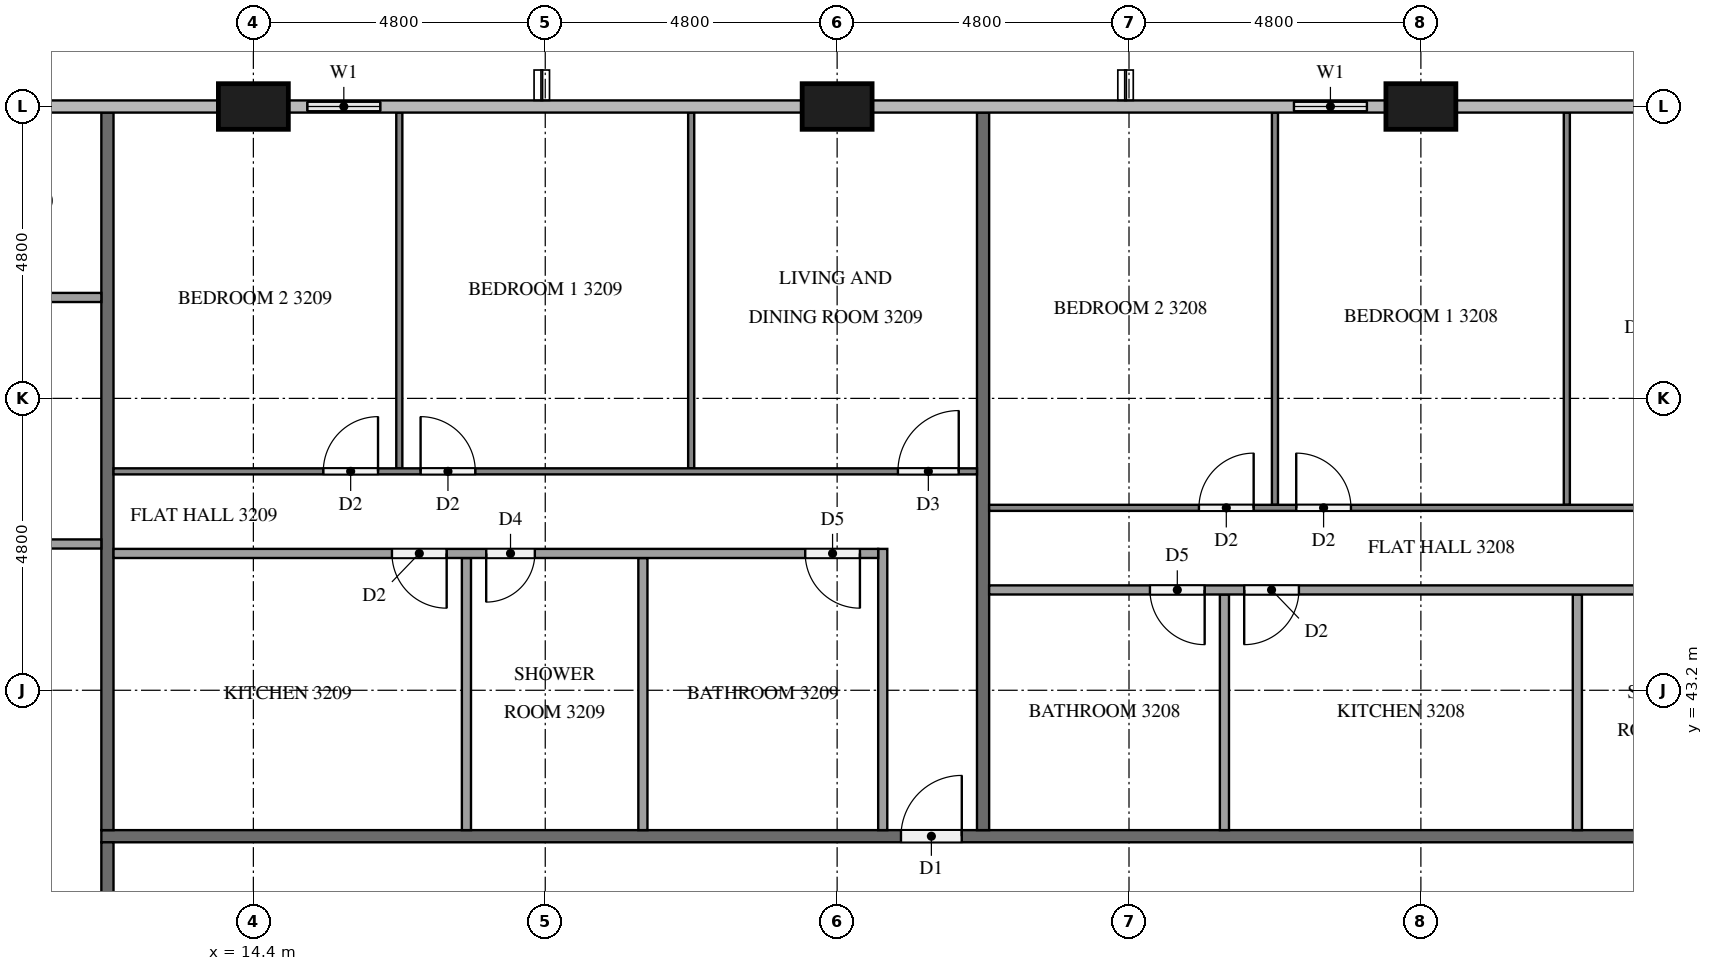
"""IFC4 building model, lengths in metres.
Left out: names, types, materials, properties, quantities, classifications, styles, units other than length and angle.
Written with IfcOpenShell. Run it as: python <this file> out.ifc"""

import sys

from ifc_helpers import new_model, si_unit, direction, frame, frame_2d, origin, origin_2d, place, context, subcontext, project, spatial, rectangle, extrude, element, fill, save


model = new_model("IFC4")
c1 = context("Model", 3, precision=1e-05, world=origin(), true_north=direction((0.0, 1.0)))
c2 = subcontext(c1, "Body", "Model", "MODEL_VIEW")
j1 = project(units=[si_unit("LENGTHUNIT", "METRE"), si_unit("PLANEANGLEUNIT", "RADIAN")], contexts=[c1])
p1 = place(None, origin())
s1 = spatial("IfcSite", under=j1, at=p1, CompositionType="ELEMENT")
p2 = place(p1, origin())
s2 = spatial("IfcBuilding", under=s1, at=p2, CompositionType="ELEMENT")
p3 = place(p2, frame((0.0, 0.0, 126.1)))
s3 = spatial("IfcBuildingStorey", under=s2, at=p3, CompositionType="ELEMENT", Elevation=126.1)
for number, where, z_axis, x_axis in (
    (1, (33.6, 52.8, 0.0), (0.0, 0.0, 1.0), (1.0, 0.0, 0.0)),
    (2, (24.0, 52.8, 0.0), (0.0, 0.0, 1.0), (1.0, 0.0, 0.0)),
    (3, (14.4, 52.8, 0.0), (0.0, 0.0, 1.0), (1.0, 0.0, 0.0)),
):
    element("IfcColumn", number, at=place(p3, frame(where, z_axis=z_axis, x_axis=x_axis)), inside=s3, PredefinedType="COLUMN", context=c2, shape_type="SweptSolid", body=[
        extrude(rectangle(XDim=1.15, YDim=0.75, at=origin_2d()), origin(), (0.0, 0.0, 1.0), 3.2),
    ])
p4 = place(p3, frame((33.025, 52.8, 0.0), z_axis=(0.0, 0.0, 1.0), x_axis=(-1.0, 0.0, 0.0)))
e4 = element("IfcWall", 4, at=p4, inside=s3, PredefinedType="SOLIDWALL", context=c2, shape_type="SweptSolid", body=[
    extrude(rectangle(XDim=1.825, YDim=0.15, at=frame_2d((0.913, 0.0))), origin(), (0.0, 0.0, 1.0), 3.2),
])
p5 = place(p4, frame((0.312, 0.0, 0.9)))
e5 = element("IfcOpeningElement", 5, at=p5, cuts=e4, PredefinedType="OPENING", context=c2, shape_type="SweptSolid", body=[
    extrude(rectangle(XDim=1.2, YDim=1.4, at=frame_2d((0.6, 0.7))), frame((0.0, 0.085, 0.0), z_axis=(0.0, -1.0, 0.0), x_axis=(1.0, 0.0, 0.0)), (0.0, 0.0, 1.0), 0.17),
])
p6 = place(p3, frame((16.8, 52.8, 0.0), z_axis=(0.0, 0.0, 1.0), x_axis=(-1.0, 0.0, 0.0)))
e6 = element("IfcWall", 6, at=p6, inside=s3, PredefinedType="SOLIDWALL", context=c2, shape_type="SweptSolid", body=[
    extrude(rectangle(XDim=1.825, YDim=0.15, at=frame_2d((0.913, 0.0))), origin(), (0.0, 0.0, 1.0), 3.2),
])
p7 = place(p6, frame((0.312, 0.0, 0.9)))
e7 = element("IfcOpeningElement", 7, at=p7, cuts=e6, PredefinedType="OPENING", context=c2, shape_type="SweptSolid", body=[
    extrude(rectangle(XDim=1.2, YDim=1.4, at=frame_2d((0.6, 0.7))), frame((0.0, 0.085, 0.0), z_axis=(0.0, -1.0, 0.0), x_axis=(1.0, 0.0, 0.0)), (0.0, 0.0, 1.0), 0.17),
])
p8 = place(p3, frame((11.9, 40.8, 0.0), z_axis=(0.0, 0.0, 1.0), x_axis=(1.0, 0.0, 0.0)))
e8 = element("IfcWall", 8, at=p8, inside=s3, PredefinedType="PARTITIONING", context=c2, shape_type="SweptSolid", body=[
    extrude(rectangle(XDim=38.6, YDim=0.2, at=frame_2d((19.3, 0.0))), origin(), (0.0, 0.0, 1.0), 3.2),
])
p9 = place(p8, frame((37.15, 0.0, 0.0)))
e9 = element("IfcOpeningElement", 9, at=p9, cuts=e8, PredefinedType="OPENING", context=c2, shape_type="SweptSolid", body=[
    extrude(rectangle(XDim=1.0, YDim=2.1, at=frame_2d((0.5, 1.05))), frame((0.0, 0.11, 0.0), z_axis=(0.0, -1.0, 0.0), x_axis=(1.0, 0.0, 0.0)), (0.0, 0.0, 1.0), 0.22),
])
p10 = place(p8, frame((27.55, 0.0, 0.0)))
e10 = element("IfcOpeningElement", 10, at=p10, cuts=e8, PredefinedType="OPENING", context=c2, shape_type="SweptSolid", body=[
    extrude(rectangle(XDim=1.0, YDim=2.1, at=frame_2d((0.5, 1.05))), frame((0.0, 0.11, 0.0), z_axis=(0.0, -1.0, 0.0), x_axis=(1.0, 0.0, 0.0)), (0.0, 0.0, 1.0), 0.22),
])
p11 = place(p8, frame((13.15, 0.0, 0.0)))
e11 = element("IfcOpeningElement", 11, at=p11, cuts=e8, PredefinedType="OPENING", context=c2, shape_type="SweptSolid", body=[
    extrude(rectangle(XDim=1.0, YDim=2.1, at=frame_2d((0.5, 1.05))), frame((0.0, 0.11, 0.0), z_axis=(0.0, -1.0, 0.0), x_axis=(1.0, 0.0, 0.0)), (0.0, 0.0, 1.0), 0.22),
])
p12 = place(p3, frame((12.0, 37.9, 0.0), z_axis=(0.0, 0.0, 1.0), x_axis=(0.0, 1.0, 0.0)))
e12 = element("IfcWall", 12, at=p12, inside=s3, PredefinedType="PARTITIONING", context=c2, shape_type="SweptSolid", body=[
    extrude(rectangle(XDim=2.8, YDim=0.2, at=frame_2d((1.4, 0.0))), origin(), (0.0, 0.0, 1.0), 3.2),
])
p13 = place(p12, frame((0.25, 0.0, 0.0)))
e13 = element("IfcOpeningElement", 13, at=p13, cuts=e12, PredefinedType="OPENING", context=c2, shape_type="SweptSolid", body=[
    extrude(rectangle(XDim=1.0, YDim=2.1, at=frame_2d((0.5, 1.05))), frame((0.0, 0.11, 0.0), z_axis=(0.0, -1.0, 0.0), x_axis=(1.0, 0.0, 0.0)), (0.0, 0.0, 1.0), 0.22),
])
for number, where, z_axis, x_axis in (
    (14, (26.4, 52.7, 0.0), (0.0, 0.0, 1.0), (0.0, -1.0, 0.0)),
    (15, (12.0, 52.7, 0.0), (0.0, 0.0, 1.0), (0.0, -1.0, 0.0)),
):
    element("IfcWall", number, at=place(p3, frame(where, z_axis=z_axis, x_axis=x_axis)), inside=s3, PredefinedType="PARTITIONING", context=c2, shape_type="SweptSolid", body=[
        extrude(rectangle(XDim=11.8, YDim=0.2, at=frame_2d((5.9, 0.0))), origin(), (0.0, 0.0, 1.0), 3.2),
    ])
for number, where, z_axis, x_axis in (
    (16, (36.0, 46.25, 0.0), (0.0, 0.0, 1.0), (0.0, 1.0, 0.0)),
    (17, (31.2, 46.25, 0.0), (0.0, 0.0, 1.0), (0.0, 1.0, 0.0)),
):
    element("IfcWall", number, at=place(p3, frame(where, z_axis=z_axis, x_axis=x_axis)), inside=s3, PredefinedType="PARTITIONING", context=c2, shape_type="SweptSolid", body=[
        extrude(rectangle(XDim=6.45, YDim=0.1, at=frame_2d((3.225, 0.0))), origin(), (0.0, 0.0, 1.0), 3.2),
    ])
p14 = place(p3, frame((26.5, 46.2, 0.0), z_axis=(0.0, 0.0, 1.0), x_axis=(1.0, 0.0, 0.0)))
e18 = element("IfcWall", 18, at=p14, inside=s3, PredefinedType="PARTITIONING", context=c2, shape_type="SweptSolid", body=[
    extrude(rectangle(XDim=14.2, YDim=0.1, at=frame_2d((7.1, 0.0))), origin(), (0.0, 0.0, 1.0), 3.2),
])
p15 = place(p14, frame((12.9, 0.0, 0.0)))
e19 = element("IfcOpeningElement", 19, at=p15, cuts=e18, PredefinedType="OPENING", context=c2, shape_type="SweptSolid", body=[
    extrude(rectangle(XDim=1.0, YDim=2.1, at=frame_2d((0.5, 1.05))), frame((0.0, 0.06, 0.0), z_axis=(0.0, -1.0, 0.0), x_axis=(1.0, 0.0, 0.0)), (0.0, 0.0, 1.0), 0.12),
])
p16 = place(p14, frame((5.05, 0.0, 0.0)))
e20 = element("IfcOpeningElement", 20, at=p16, cuts=e18, PredefinedType="OPENING", context=c2, shape_type="SweptSolid", body=[
    extrude(rectangle(XDim=0.9, YDim=2.1, at=frame_2d((0.45, 1.05))), frame((0.0, 0.06, 0.0), z_axis=(0.0, -1.0, 0.0), x_axis=(1.0, 0.0, 0.0)), (0.0, 0.0, 1.0), 0.12),
])
p17 = place(p14, frame((3.45, 0.0, 0.0)))
e21 = element("IfcOpeningElement", 21, at=p17, cuts=e18, PredefinedType="OPENING", context=c2, shape_type="SweptSolid", body=[
    extrude(rectangle(XDim=0.9, YDim=2.1, at=frame_2d((0.45, 1.05))), frame((0.0, 0.06, 0.0), z_axis=(0.0, -1.0, 0.0), x_axis=(1.0, 0.0, 0.0)), (0.0, 0.0, 1.0), 0.12),
])
for number, where, z_axis, x_axis in (
    (22, (36.173, 40.9, 0.0), (0.0, 0.0, 1.0), (0.0, 1.0, 0.0)),
    (23, (30.369, 40.9, 0.0), (0.0, 0.0, 1.0), (0.0, 1.0, 0.0)),
):
    element("IfcWall", number, at=place(p3, frame(where, z_axis=z_axis, x_axis=x_axis)), inside=s3, PredefinedType="PARTITIONING", context=c2, shape_type="SweptSolid", body=[
        extrude(rectangle(XDim=3.875, YDim=0.15, at=frame_2d((1.938, 0.0))), origin(), (0.0, 0.0, 1.0), 3.2),
    ])
p18 = place(p3, frame((39.075, 44.85, 0.0), z_axis=(0.0, 0.0, 1.0), x_axis=(-1.0, 0.0, 0.0)))
e24 = element("IfcWall", 24, at=p18, inside=s3, PredefinedType="PARTITIONING", context=c2, shape_type="SweptSolid", body=[
    extrude(rectangle(XDim=12.575, YDim=0.15, at=frame_2d((6.288, 0.0))), origin(), (0.0, 0.0, 1.0), 3.2),
])
p19 = place(p18, frame((0.3, 0.0, 0.0)))
e25 = element("IfcOpeningElement", 25, at=p19, cuts=e24, PredefinedType="OPENING", context=c2, shape_type="SweptSolid", body=[
    extrude(rectangle(XDim=0.8, YDim=2.1, at=frame_2d((0.4, 1.05))), frame((0.0, 0.085, 0.0), z_axis=(0.0, -1.0, 0.0), x_axis=(1.0, 0.0, 0.0)), (0.0, 0.0, 1.0), 0.17),
])
p20 = place(p18, frame((7.481, 0.0, 0.0)))
e26 = element("IfcOpeningElement", 26, at=p20, cuts=e24, PredefinedType="OPENING", context=c2, shape_type="SweptSolid", body=[
    extrude(rectangle(XDim=0.9, YDim=2.1, at=frame_2d((0.45, 1.05))), frame((0.0, 0.085, 0.0), z_axis=(0.0, -1.0, 0.0), x_axis=(1.0, 0.0, 0.0)), (0.0, 0.0, 1.0), 0.17),
])
p21 = place(p18, frame((9.031, 0.0, 0.0)))
e27 = element("IfcOpeningElement", 27, at=p21, cuts=e24, PredefinedType="OPENING", context=c2, shape_type="SweptSolid", body=[
    extrude(rectangle(XDim=0.9, YDim=2.1, at=frame_2d((0.45, 1.05))), frame((0.0, 0.085, 0.0), z_axis=(0.0, -1.0, 0.0), x_axis=(1.0, 0.0, 0.0)), (0.0, 0.0, 1.0), 0.17),
])
for number, where, z_axis, x_axis in (
    (28, (21.6, 46.85, 0.0), (0.0, 0.0, 1.0), (0.0, 1.0, 0.0)),
    (29, (16.8, 46.85, 0.0), (0.0, 0.0, 1.0), (0.0, 1.0, 0.0)),
):
    element("IfcWall", number, at=place(p3, frame(where, z_axis=z_axis, x_axis=x_axis)), inside=s3, PredefinedType="PARTITIONING", context=c2, shape_type="SweptSolid", body=[
        extrude(rectangle(XDim=5.85, YDim=0.1, at=frame_2d((2.925, 0.0))), origin(), (0.0, 0.0, 1.0), 3.2),
    ])
p22 = place(p3, frame((12.1, 46.8, 0.0), z_axis=(0.0, 0.0, 1.0), x_axis=(1.0, 0.0, 0.0)))
e30 = element("IfcWall", 30, at=p22, inside=s3, PredefinedType="PARTITIONING", context=c2, shape_type="SweptSolid", body=[
    extrude(rectangle(XDim=14.2, YDim=0.1, at=frame_2d((7.1, 0.0))), origin(), (0.0, 0.0, 1.0), 3.2),
])
p23 = place(p22, frame((12.9, 0.0, 0.0)))
e31 = element("IfcOpeningElement", 31, at=p23, cuts=e30, PredefinedType="OPENING", context=c2, shape_type="SweptSolid", body=[
    extrude(rectangle(XDim=1.0, YDim=2.1, at=frame_2d((0.5, 1.05))), frame((0.0, 0.06, 0.0), z_axis=(0.0, -1.0, 0.0), x_axis=(1.0, 0.0, 0.0)), (0.0, 0.0, 1.0), 0.12),
])
p24 = place(p22, frame((5.05, 0.0, 0.0)))
e32 = element("IfcOpeningElement", 32, at=p24, cuts=e30, PredefinedType="OPENING", context=c2, shape_type="SweptSolid", body=[
    extrude(rectangle(XDim=0.9, YDim=2.1, at=frame_2d((0.45, 1.05))), frame((0.0, 0.06, 0.0), z_axis=(0.0, -1.0, 0.0), x_axis=(1.0, 0.0, 0.0)), (0.0, 0.0, 1.0), 0.12),
])
p25 = place(p22, frame((3.45, 0.0, 0.0)))
e33 = element("IfcOpeningElement", 33, at=p25, cuts=e30, PredefinedType="OPENING", context=c2, shape_type="SweptSolid", body=[
    extrude(rectangle(XDim=0.9, YDim=2.1, at=frame_2d((0.45, 1.05))), frame((0.0, 0.06, 0.0), z_axis=(0.0, -1.0, 0.0), x_axis=(1.0, 0.0, 0.0)), (0.0, 0.0, 1.0), 0.12),
])
for number, where, z_axis, x_axis in (
    (34, (20.806, 40.9, 0.0), (0.0, 0.0, 1.0), (0.0, 1.0, 0.0)),
    (35, (17.904, 40.9, 0.0), (0.0, 0.0, 1.0), (0.0, 1.0, 0.0)),
):
    element("IfcWall", number, at=place(p3, frame(where, z_axis=z_axis, x_axis=x_axis)), inside=s3, PredefinedType="PARTITIONING", context=c2, shape_type="SweptSolid", body=[
        extrude(rectangle(XDim=4.475, YDim=0.15, at=frame_2d((2.238, 0.0))), origin(), (0.0, 0.0, 1.0), 3.2),
    ])
p26 = place(p3, frame((24.75, 40.9, 0.0), z_axis=(0.0, 0.0, 1.0), x_axis=(0.0, 1.0, 0.0)))
e36 = element("IfcWall", 36, at=p26, inside=s3, PredefinedType="PARTITIONING", context=c2, shape_type="SweptSolid", body=[
    extrude(rectangle(XDim=4.625, YDim=0.15, at=frame_2d((2.312, 0.0))), origin(), (0.0, 0.0, 1.0), 3.2),
])
p27 = place(p3, frame((24.675, 45.45, 0.0), z_axis=(0.0, 0.0, 1.0), x_axis=(-1.0, 0.0, 0.0)))
e37 = element("IfcWall", 37, at=p27, inside=s3, PredefinedType="PARTITIONING", context=c2, shape_type="SweptSolid", body=[
    extrude(rectangle(XDim=12.575, YDim=0.15, at=frame_2d((6.288, 0.0))), origin(), (0.0, 0.0, 1.0), 3.2),
])
p28 = place(p27, frame((0.3, 0.0, 0.0)))
e38 = element("IfcOpeningElement", 38, at=p28, cuts=e37, PredefinedType="OPENING", context=c2, shape_type="SweptSolid", body=[
    extrude(rectangle(XDim=0.9, YDim=2.1, at=frame_2d((0.45, 1.05))), frame((0.0, 0.085, 0.0), z_axis=(0.0, -1.0, 0.0), x_axis=(1.0, 0.0, 0.0)), (0.0, 0.0, 1.0), 0.17),
])
p29 = place(p27, frame((5.646, 0.0, 0.0)))
e39 = element("IfcOpeningElement", 39, at=p29, cuts=e37, PredefinedType="OPENING", context=c2, shape_type="SweptSolid", body=[
    extrude(rectangle(XDim=0.8, YDim=2.1, at=frame_2d((0.4, 1.05))), frame((0.0, 0.085, 0.0), z_axis=(0.0, -1.0, 0.0), x_axis=(1.0, 0.0, 0.0)), (0.0, 0.0, 1.0), 0.17),
])
p30 = place(p27, frame((7.096, 0.0, 0.0)))
e40 = element("IfcOpeningElement", 40, at=p30, cuts=e37, PredefinedType="OPENING", context=c2, shape_type="SweptSolid", body=[
    extrude(rectangle(XDim=0.9, YDim=2.1, at=frame_2d((0.45, 1.05))), frame((0.0, 0.085, 0.0), z_axis=(0.0, -1.0, 0.0), x_axis=(1.0, 0.0, 0.0)), (0.0, 0.0, 1.0), 0.17),
])
for number, where, z_axis, x_axis in (
    (41, (11.9, 45.606, 0.0), (0.0, 0.0, 1.0), (-1.0, 0.0, 0.0)),
    (42, (11.9, 49.66, 0.0), (0.0, 0.0, 1.0), (-1.0, 0.0, 0.0)),
):
    element("IfcWall", number, at=place(p3, frame(where, z_axis=z_axis, x_axis=x_axis)), inside=s3, PredefinedType="PARTITIONING", context=c2, shape_type="SweptSolid", body=[
        extrude(rectangle(XDim=4.175, YDim=0.15, at=frame_2d((2.087, 0.0))), origin(), (0.0, 0.0, 1.0), 3.2),
    ])
p31 = place(p5, origin())
e43 = element("IfcWindow", 43, at=p31, inside=s3, PartitioningType="SINGLE_PANEL", PredefinedType="WINDOW", context=c2, shape_type="SweptSolid", body=[
    extrude(rectangle(XDim=1.2, YDim=1.4, at=frame_2d((0.6, 0.7))), frame((0.0, 0.03, 0.0), z_axis=(0.0, -1.0, 0.0), x_axis=(1.0, 0.0, 0.0)), (0.0, 0.0, 1.0), 0.06),
])
fill(e5, e43)
p32 = place(p7, origin())
e44 = element("IfcWindow", 44, at=p32, inside=s3, PartitioningType="SINGLE_PANEL", PredefinedType="WINDOW", context=c2, shape_type="SweptSolid", body=[
    extrude(rectangle(XDim=1.2, YDim=1.4, at=frame_2d((0.6, 0.7))), frame((0.0, 0.03, 0.0), z_axis=(0.0, -1.0, 0.0), x_axis=(1.0, 0.0, 0.0)), (0.0, 0.0, 1.0), 0.06),
])
fill(e7, e44)
p33 = place(p11, origin())
e45 = element("IfcDoor", 45, at=p33, inside=s3, OperationType="SINGLE_SWING_RIGHT", PredefinedType="DOOR", context=c2, shape_type="SweptSolid", body=[
    extrude(rectangle(XDim=1.0, YDim=2.1, at=frame_2d((0.5, 1.05))), frame((0.0, 0.025, 0.0), z_axis=(0.0, -1.0, 0.0), x_axis=(1.0, 0.0, 0.0)), (0.0, 0.0, 1.0), 0.05),
])
fill(e11, e45)
p34 = place(p16, origin())
e46 = element("IfcDoor", 46, at=p34, inside=s3, OperationType="SINGLE_SWING_LEFT", PredefinedType="DOOR", context=c2, shape_type="SweptSolid", body=[
    extrude(rectangle(XDim=0.9, YDim=2.1, at=frame_2d((0.45, 1.05))), frame((0.0, 0.025, 0.0), z_axis=(0.0, -1.0, 0.0), x_axis=(1.0, 0.0, 0.0)), (0.0, 0.0, 1.0), 0.05),
])
fill(e20, e46)
p35 = place(p17, origin())
e47 = element("IfcDoor", 47, at=p35, inside=s3, OperationType="SINGLE_SWING_RIGHT", PredefinedType="DOOR", context=c2, shape_type="SweptSolid", body=[
    extrude(rectangle(XDim=0.9, YDim=2.1, at=frame_2d((0.45, 1.05))), frame((0.0, 0.025, 0.0), z_axis=(0.0, -1.0, 0.0), x_axis=(1.0, 0.0, 0.0)), (0.0, 0.0, 1.0), 0.05),
])
fill(e21, e47)
p36 = place(p20, origin())
e48 = element("IfcDoor", 48, at=p36, inside=s3, OperationType="SINGLE_SWING_RIGHT", PredefinedType="DOOR", context=c2, shape_type="SweptSolid", body=[
    extrude(rectangle(XDim=0.9, YDim=2.1, at=frame_2d((0.45, 1.05))), frame((0.0, 0.025, 0.0), z_axis=(0.0, -1.0, 0.0), x_axis=(1.0, 0.0, 0.0)), (0.0, 0.0, 1.0), 0.05),
])
fill(e26, e48)
p37 = place(p21, origin())
e49 = element("IfcDoor", 49, at=p37, inside=s3, OperationType="SINGLE_SWING_LEFT", PredefinedType="DOOR", context=c2, shape_type="SweptSolid", body=[
    extrude(rectangle(XDim=0.9, YDim=2.1, at=frame_2d((0.45, 1.05))), frame((0.0, 0.025, 0.0), z_axis=(0.0, -1.0, 0.0), x_axis=(1.0, 0.0, 0.0)), (0.0, 0.0, 1.0), 0.05),
])
fill(e27, e49)
p38 = place(p23, origin())
e50 = element("IfcDoor", 50, at=p38, inside=s3, OperationType="SINGLE_SWING_RIGHT", PredefinedType="DOOR", context=c2, shape_type="SweptSolid", body=[
    extrude(rectangle(XDim=1.0, YDim=2.1, at=frame_2d((0.5, 1.05))), frame((0.0, 0.025, 0.0), z_axis=(0.0, -1.0, 0.0), x_axis=(1.0, 0.0, 0.0)), (0.0, 0.0, 1.0), 0.05),
])
fill(e31, e50)
p39 = place(p24, origin())
e51 = element("IfcDoor", 51, at=p39, inside=s3, OperationType="SINGLE_SWING_LEFT", PredefinedType="DOOR", context=c2, shape_type="SweptSolid", body=[
    extrude(rectangle(XDim=0.9, YDim=2.1, at=frame_2d((0.45, 1.05))), frame((0.0, 0.025, 0.0), z_axis=(0.0, -1.0, 0.0), x_axis=(1.0, 0.0, 0.0)), (0.0, 0.0, 1.0), 0.05),
])
fill(e32, e51)
p40 = place(p25, origin())
e52 = element("IfcDoor", 52, at=p40, inside=s3, OperationType="SINGLE_SWING_RIGHT", PredefinedType="DOOR", context=c2, shape_type="SweptSolid", body=[
    extrude(rectangle(XDim=0.9, YDim=2.1, at=frame_2d((0.45, 1.05))), frame((0.0, 0.025, 0.0), z_axis=(0.0, -1.0, 0.0), x_axis=(1.0, 0.0, 0.0)), (0.0, 0.0, 1.0), 0.05),
])
fill(e33, e52)
p41 = place(p28, origin())
e53 = element("IfcDoor", 53, at=p41, inside=s3, OperationType="SINGLE_SWING_LEFT", PredefinedType="DOOR", context=c2, shape_type="SweptSolid", body=[
    extrude(rectangle(XDim=0.9, YDim=2.1, at=frame_2d((0.45, 1.05))), frame((0.0, 0.025, 0.0), z_axis=(0.0, -1.0, 0.0), x_axis=(1.0, 0.0, 0.0)), (0.0, 0.0, 1.0), 0.05),
])
fill(e38, e53)
p42 = place(p29, origin())
e54 = element("IfcDoor", 54, at=p42, inside=s3, OperationType="SINGLE_SWING_RIGHT", PredefinedType="DOOR", context=c2, shape_type="SweptSolid", body=[
    extrude(rectangle(XDim=0.8, YDim=2.1, at=frame_2d((0.4, 1.05))), frame((0.0, 0.025, 0.0), z_axis=(0.0, -1.0, 0.0), x_axis=(1.0, 0.0, 0.0)), (0.0, 0.0, 1.0), 0.05),
])
fill(e39, e54)
p43 = place(p30, origin())
e55 = element("IfcDoor", 55, at=p43, inside=s3, OperationType="SINGLE_SWING_LEFT", PredefinedType="DOOR", context=c2, shape_type="SweptSolid", body=[
    extrude(rectangle(XDim=0.9, YDim=2.1, at=frame_2d((0.45, 1.05))), frame((0.0, 0.025, 0.0), z_axis=(0.0, -1.0, 0.0), x_axis=(1.0, 0.0, 0.0)), (0.0, 0.0, 1.0), 0.05),
])
fill(e40, e55)
save(model, sys.argv[1])
